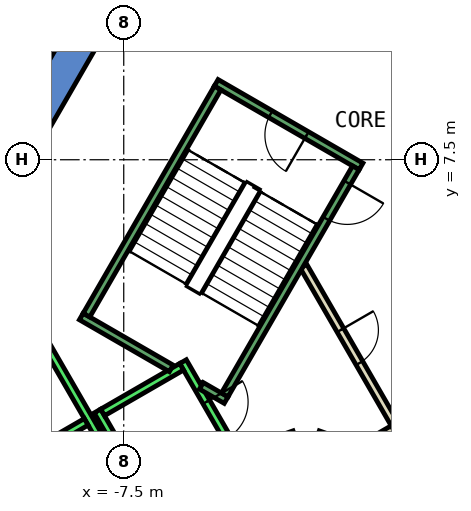
"""IFC4 building model, lengths in metres.
Left out: names, types, materials, properties, quantities, classifications, styles, units other than length and angle.
Written with IfcOpenShell. Run it as: python <this file> out.ifc"""

import sys

from ifc_helpers import new_model, si_unit, direction, frame, frame_2d, origin, place, context, subcontext, project, spatial, polyline, rectangle, outline, extrude, element, fill, save


model = new_model("IFC4")
c1 = context("Model", 3, precision=1e-05, world=origin(), true_north=direction((0.0, 1.0)))
c2 = subcontext(c1, "Body", "Model", "MODEL_VIEW")
j1 = project(units=[si_unit("LENGTHUNIT", "METRE"), si_unit("PLANEANGLEUNIT", "RADIAN")], contexts=[c1])
p1 = place(None, origin())
s1 = spatial("IfcSite", under=j1, at=p1, CompositionType="ELEMENT")
p2 = place(p1, origin())
s2 = spatial("IfcBuilding", under=s1, at=p2, CompositionType="ELEMENT")
p3 = place(p2, frame((0.0, 0.0, 120.2)))
s3 = spatial("IfcBuildingStorey", under=s2, at=p3, CompositionType="ELEMENT", Elevation=120.2)
p4 = place(p3, frame((0.0, 0.0, -0.4)))
e1 = element("IfcWall", 1, at=p4, inside=s3, PredefinedType="SHEAR", context=c2, shape_type="SweptSolid", body=[
    extrude(outline(polyline([(-12.267, 5.252), (-11.488, 4.802), (-6.409, 13.6), (-6.928, 14.5), (-12.267, 5.252)])), origin(), (0.0, 0.0, 1.0), 4.2),
])
p5 = place(p3, frame((0.0, 0.0, -0.4)))
e2 = element("IfcWall", 2, at=p5, inside=s3, PredefinedType="SHEAR", context=c2, shape_type="SweptSolid", body=[
    extrude(outline(polyline([(-13.856, 2.5), (-6.928, -9.5), (-6.409, -8.6), (-12.817, 2.5), (-13.856, 2.5)])), origin(), (0.0, 0.0, 1.0), 4.2),
])
p6 = place(p3, frame((-0.52, -1.0, 0.0), z_axis=(0.0, 0.0, 1.0), x_axis=(0.50011622646, 0.865958290007, 0.0)))
e3 = element("IfcWall", 3, at=p6, inside=s3, PredefinedType="PARTITIONING", context=c2, shape_type="SweptSolid", body=[
    extrude(rectangle(XDim=4.991, YDim=0.2, at=frame_2d((2.496, 0.0))), origin(), (0.0, 0.0, 1.0), 3.8),
])
p7 = place(p6, frame((1.945, 0.0, 0.0)))
e4 = element("IfcOpeningElement", 4, at=p7, cuts=e3, PredefinedType="OPENING", context=c2, shape_type="SweptSolid", body=[
    extrude(rectangle(XDim=1.0, YDim=2.1, at=frame_2d((0.5, 1.05))), frame((0.0, 0.11, 0.0), z_axis=(0.0, -1.0, 0.0), x_axis=(1.0, 0.0, 0.0)), (0.0, 0.0, 1.0), 0.22),
])
p8 = place(p3, frame((-2.771, 4.7, 0.0), z_axis=(0.0, 0.0, 1.0), x_axis=(0.499969479948, -0.866043023828, 0.0)))
e5 = element("IfcWall", 5, at=p8, inside=s3, PredefinedType="PARTITIONING", context=c2, shape_type="SweptSolid", body=[
    extrude(rectangle(XDim=4.99, YDim=0.2, at=frame_2d((2.495, 0.0))), origin(), (0.0, 0.0, 1.0), 3.8),
])
p9 = place(p8, frame((1.945, 0.0, 0.0)))
e6 = element("IfcOpeningElement", 6, at=p9, cuts=e5, PredefinedType="OPENING", context=c2, shape_type="SweptSolid", body=[
    extrude(rectangle(XDim=1.0, YDim=2.1, at=frame_2d((0.5, 1.05))), frame((0.0, 0.11, 0.0), z_axis=(0.0, -1.0, 0.0), x_axis=(1.0, 0.0, 0.0)), (0.0, 0.0, 1.0), 0.22),
])
p10 = place(p3, frame((-0.412, 0.414, 0.0), z_axis=(0.0, 0.0, 1.0), x_axis=(-0.866017369001, -0.500013916395, 0.0)))
e7 = element("IfcWall", 7, at=p10, inside=s3, PredefinedType="PARTITIONING", context=c2, shape_type="SweptSolid", body=[
    extrude(rectangle(XDim=1.45, YDim=0.2, at=frame_2d((0.725, 0.0))), origin(), (0.0, 0.0, 1.0), 3.8),
])
p11 = place(p3, frame((-2.07, 0.16, 0.0), z_axis=(0.0, 0.0, 1.0), x_axis=(-0.942199461132, 0.335052496547, 0.0)))
e8 = element("IfcWall", 8, at=p11, inside=s3, PredefinedType="PARTITIONING", context=c2, shape_type="SweptSolid", body=[
    extrude(rectangle(XDim=0.337, YDim=0.2, at=frame_2d((0.169, 0.0))), origin(), (0.0, 0.0, 1.0), 3.8),
])
p12 = place(p3, frame((-3.012, 0.273, 0.0), z_axis=(0.0, 0.0, 1.0), x_axis=(-0.942280615813, -0.334824194261, 0.0)))
e9 = element("IfcWall", 9, at=p12, inside=s3, PredefinedType="PARTITIONING", context=c2, shape_type="SweptSolid", body=[
    extrude(rectangle(XDim=0.338, YDim=0.2, at=frame_2d((0.169, 0.0))), origin(), (0.0, 0.0, 1.0), 3.8),
])
p13 = place(p3, frame((-5.94, 2.188, 0.0), z_axis=(0.0, 0.0, 1.0), x_axis=(0.49994636267, -0.866056369097, 0.0)))
e10 = element("IfcWall", 10, at=p13, inside=s3, PredefinedType="STANDARD", context=c2, shape_type="SweptSolid", body=[
    extrude(rectangle(XDim=2.8, YDim=0.2, at=frame_2d((1.4, 0.0))), origin(), (0.0, 0.0, 1.0), 3.8),
])
p14 = place(p13, frame((1.225, 0.0, 0.0)))
e11 = element("IfcOpeningElement", 11, at=p14, cuts=e10, PredefinedType="OPENING", context=c2, shape_type="SweptSolid", body=[
    extrude(rectangle(XDim=1.1, YDim=2.1, at=frame_2d((0.55, 1.05))), frame((0.0, 0.11, 0.0), z_axis=(0.0, -1.0, 0.0), x_axis=(1.0, 0.0, 0.0)), (0.0, 0.0, 1.0), 0.22),
])
p15 = place(p3, frame((-8.192, 0.888, 0.0), z_axis=(0.0, 0.0, 1.0), x_axis=(0.49994636267, -0.866056369097, 0.0)))
e12 = element("IfcWall", 12, at=p15, inside=s3, PredefinedType="STANDARD", context=c2, shape_type="SweptSolid", body=[
    extrude(rectangle(XDim=2.8, YDim=0.2, at=frame_2d((1.4, 0.0))), origin(), (0.0, 0.0, 1.0), 3.8),
])
p16 = place(p3, frame((-5.977, 2.052, 0.0), z_axis=(0.0, 0.0, 1.0), x_axis=(-0.865973769406, -0.500089422704, 0.0)))
e13 = element("IfcWall", 13, at=p16, inside=s3, PredefinedType="STANDARD", context=c2, shape_type="SweptSolid", body=[
    extrude(rectangle(XDim=2.399, YDim=0.2, at=frame_2d((1.2, 0.0))), origin(), (0.0, 0.0, 1.0), 3.8),
])
p17 = place(p3, frame((-9.751, 2.99, 0.0), z_axis=(0.0, 0.0, 1.0), x_axis=(0.50000090737, -0.866024879913, 0.0)))
e14 = element("IfcWall", 14, at=p17, inside=s3, PredefinedType="STANDARD", context=c2, shape_type="SweptSolid", body=[
    extrude(rectangle(XDim=10.6, YDim=0.2, at=frame_2d((5.3, 0.0))), origin(), (0.0, 0.0, 1.0), 3.8),
])
p18 = place(p3, frame((-8.488, 0.602, 0.0), z_axis=(0.0, 0.0, 1.0), x_axis=(-0.866022959057, -0.500004234368, 0.0)))
e15 = element("IfcWall", 15, at=p18, inside=s3, PredefinedType="STANDARD", context=c2, shape_type="SweptSolid", body=[
    extrude(rectangle(XDim=2.5, YDim=0.2, at=frame_2d((1.25, 0.0))), origin(), (0.0, 0.0, 1.0), 3.8),
])
p19 = place(p3, frame((-1.256, 7.324, 0.0), z_axis=(0.0, 0.0, 1.0), x_axis=(-0.866046073146, 0.499964197906, 0.0)))
e16 = element("IfcWall", 16, at=p19, inside=s3, PredefinedType="STANDARD", context=c2, shape_type="SweptSolid", body=[
    extrude(rectangle(XDim=4.4, YDim=0.2, at=frame_2d((2.2, 0.0))), origin(), (0.0, 0.0, 1.0), 3.8),
])
p20 = place(p19, frame((1.65, 0.0, 0.0)))
e17 = element("IfcOpeningElement", 17, at=p20, cuts=e16, PredefinedType="OPENING", context=c2, shape_type="SweptSolid", body=[
    extrude(rectangle(XDim=1.1, YDim=2.2, at=frame_2d((0.55, 1.1))), frame((0.0, 0.11, 0.0), z_axis=(0.0, -1.0, 0.0), x_axis=(1.0, 0.0, 0.0)), (0.0, 0.0, 1.0), 0.22),
])
p21 = place(p3, frame((-6.25, 2.01, 0.0), z_axis=(0.0, 0.0, 1.0), x_axis=(-0.86611865017, 0.499838457731, 0.0)))
e18 = element("IfcWall", 18, at=p21, inside=s3, PredefinedType="STANDARD", context=c2, shape_type="SweptSolid", body=[
    extrude(rectangle(XDim=2.733, YDim=0.2, at=frame_2d((1.366, 0.0))), origin(), (0.0, 0.0, 1.0), 3.8),
])
p22 = place(p3, frame((-4.806, 1.176, 0.0), z_axis=(0.0, 0.0, 1.0), x_axis=(-0.866558586415, 0.499075361355, 0.0)))
e19 = element("IfcWall", 19, at=p22, inside=s3, PredefinedType="STANDARD", context=c2, shape_type="SweptSolid", body=[
    extrude(rectangle(XDim=0.751, YDim=0.2, at=frame_2d((0.376, 0.0))), origin(), (0.0, 0.0, 1.0), 3.8),
])
p23 = place(p3, frame((-1.393, 7.288, 0.0), z_axis=(0.0, 0.0, 1.0), x_axis=(-0.499963383562, -0.866046543262, 0.0)))
e20 = element("IfcWall", 20, at=p23, inside=s3, PredefinedType="STANDARD", context=c2, shape_type="SweptSolid", body=[
    extrude(rectangle(XDim=6.9, YDim=0.2, at=frame_2d((3.45, 0.0))), origin(), (0.0, 0.0, 1.0), 3.8),
])
p24 = place(p23, frame((0.45, 0.0, 0.0)))
e21 = element("IfcOpeningElement", 21, at=p24, cuts=e20, PredefinedType="OPENING", context=c2, shape_type="SweptSolid", body=[
    extrude(rectangle(XDim=1.1, YDim=2.2, at=frame_2d((0.55, 1.1))), frame((0.0, 0.11, 0.0), z_axis=(0.0, -1.0, 0.0), x_axis=(1.0, 0.0, 0.0)), (0.0, 0.0, 1.0), 0.22),
])
p25 = place(p3, frame((-5.03, 9.388, 0.0), z_axis=(0.0, 0.0, 1.0), x_axis=(-0.499978703459, -0.866037698999, 0.0)))
e22 = element("IfcWall", 22, at=p25, inside=s3, PredefinedType="STANDARD", context=c2, shape_type="SweptSolid", body=[
    extrude(rectangle(XDim=6.9, YDim=0.2, at=frame_2d((3.45, 0.0))), origin(), (0.0, 0.0, 1.0), 3.8),
])
p26 = place(p9, origin())
e23 = element("IfcDoor", 23, at=p26, inside=s3, OperationType="SINGLE_SWING_RIGHT", PredefinedType="DOOR", context=c2, shape_type="SweptSolid", body=[
    extrude(rectangle(XDim=1.0, YDim=2.1, at=frame_2d((0.5, 1.05))), frame((0.0, 0.025, 0.0), z_axis=(0.0, -1.0, 0.0), x_axis=(1.0, 0.0, 0.0)), (0.0, 0.0, 1.0), 0.05),
])
fill(e6, e23)
p27 = place(p14, origin())
e24 = element("IfcDoor", 24, at=p27, inside=s3, OperationType="SLIDING_TO_LEFT", PredefinedType="DOOR", context=c2, shape_type="SweptSolid", body=[
    extrude(rectangle(XDim=1.1, YDim=2.1, at=frame_2d((0.55, 1.05))), frame((0.0, 0.025, 0.0), z_axis=(0.0, -1.0, 0.0), x_axis=(1.0, 0.0, 0.0)), (0.0, 0.0, 1.0), 0.05),
])
fill(e11, e24)
p28 = place(p24, origin())
e25 = element("IfcDoor", 25, at=p28, inside=s3, OperationType="SINGLE_SWING_LEFT", PredefinedType="DOOR", context=c2, shape_type="SweptSolid", body=[
    extrude(rectangle(XDim=1.1, YDim=2.2, at=frame_2d((0.55, 1.1))), frame((0.0, 0.025, 0.0), z_axis=(0.0, -1.0, 0.0), x_axis=(1.0, 0.0, 0.0)), (0.0, 0.0, 1.0), 0.05),
])
fill(e21, e25)
p29 = place(p20, origin())
e26 = element("IfcDoor", 26, at=p29, inside=s3, OperationType="SINGLE_SWING_LEFT", PredefinedType="DOOR", context=c2, shape_type="SweptSolid", body=[
    extrude(rectangle(XDim=1.1, YDim=2.2, at=frame_2d((0.55, 1.1))), frame((0.0, 0.025, 0.0), z_axis=(0.0, -1.0, 0.0), x_axis=(1.0, 0.0, 0.0)), (0.0, 0.0, 1.0), 0.05),
])
fill(e17, e26)
save(model, sys.argv[1])
